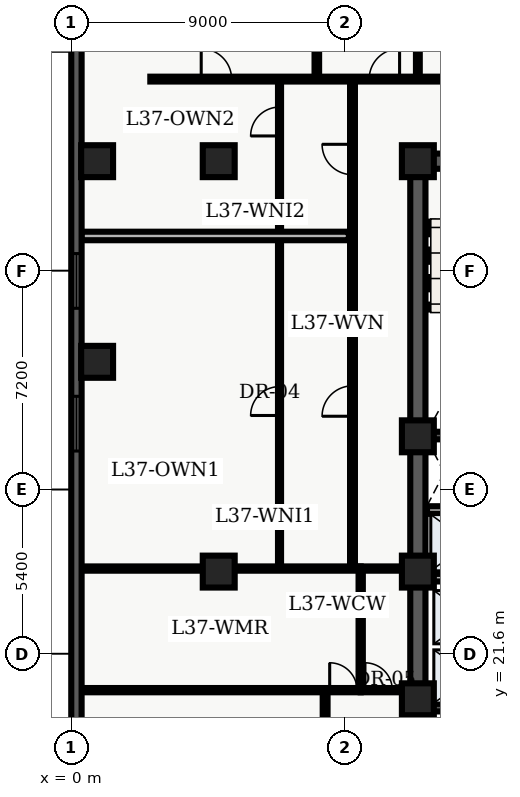
"""IFC4 building model, lengths in metres.
Left out: names, types, materials, properties, quantities, classifications, styles, units other than length and angle.
Written with IfcOpenShell. Run it as: python <this file> out.ifc"""

import sys

from ifc_helpers import new_model, entity, si_unit, converted_unit, direction, frame, origin_with_axes, origin_2d_with_axis, place, context, subcontext, project, spatial, polyline, rectangle, outline, extrude, element, fill, save


model = new_model("IFC4")
c1 = context("Model", 3, precision=1e-05, world=origin_with_axes(), true_north=direction((0.0, 1.0)))
c2 = subcontext(c1, "Body", "Model", "MODEL_VIEW")
j1 = project(units=[si_unit("LENGTHUNIT", "METRE"), converted_unit("PLANEANGLEUNIT", "DEGREE", entity("IfcPlaneAngleMeasure", 0.017), si_unit("PLANEANGLEUNIT", "RADIAN"), dimensions=[0, 0, 0, 0, 0, 0, 0])], contexts=[c1])
p1 = place(None, origin_with_axes())
s1 = spatial("IfcSite", under=j1, at=p1, CompositionType="ELEMENT")
p2 = place(p1, origin_with_axes())
s2 = spatial("IfcBuilding", under=s1, at=p2, CompositionType="ELEMENT")
p3 = place(p2, frame((0.0, 0.0, 152.4), z_axis=(0.0, 0.0, 1.0), x_axis=(1.0, 0.0, 0.0)))
s3 = spatial("IfcBuildingStorey", under=s2, at=p3, CompositionType="ELEMENT", Elevation=152.4)
p4 = place(p3, frame((11.4, 10.8, 0.0), z_axis=(0.0, 0.0, 1.0), x_axis=(0.0, 1.0, 0.0)))
e1 = element("IfcWall", 1, at=p4, inside=s3, PredefinedType="SHEAR", context=c2, shape_type="SweptSolid", body=[
    extrude(outline(polyline([(0.0, -0.25), (27.0, -0.25), (27.0, 0.25), (0.0, 0.25), (0.0, -0.25)])), origin_with_axes(), (0.0, 0.0, 1.0), 3.66),
])
p5 = place(p3, frame((11.4, 37.8, 0.0), z_axis=(0.0, 0.0, 1.0), x_axis=(1.0, 0.0, 0.0)))
e2 = element("IfcWall", 2, at=p5, inside=s3, PredefinedType="SHEAR", context=c2, shape_type="SweptSolid", body=[
    extrude(outline(polyline([(0.0, -0.25), (7.2, -0.25), (7.2, 0.25), (0.0, 0.25), (0.0, -0.25)])), origin_with_axes(), (0.0, 0.0, 1.0), 3.66),
])
p6 = place(p5, frame((2.625, 0.0, 0.0), z_axis=(0.0, 0.0, 1.0), x_axis=(1.0, 0.0, 0.0)))
e3 = element("IfcOpeningElement", 3, at=p6, cuts=e2, PredefinedType="OPENING", context=c2, shape_type="SweptSolid", body=[
    extrude(rectangle(XDim=1.05, YDim=0.52, at=origin_2d_with_axis()), origin_with_axes(), (0.0, 0.0, 1.0), 2.15),
])
for number, where, z_axis, x_axis in (
    (4, (11.65, 19.825, 0.0), (0.0, 0.0, 1.0), (1.0, 0.0, 0.0)),
    (5, (11.65, 28.775, 0.0), (0.0, 0.0, 1.0), (1.0, 0.0, 0.0)),
):
    element("IfcWall", number, at=place(p3, frame(where, z_axis=z_axis, x_axis=x_axis)), inside=s3, PredefinedType="SHEAR", context=c2, shape_type="SweptSolid", body=[
        extrude(outline(polyline([(0.0, -0.125), (6.7, -0.125), (6.7, 0.125), (0.0, 0.125), (0.0, -0.125)])), origin_with_axes(), (0.0, 0.0, 1.0), 3.66),
    ])
p7 = place(p3, frame((11.7, 24.1, 0.0), z_axis=(0.0, 0.0, 1.0), x_axis=(1.0, 0.0, 0.0)))
e6 = element("IfcWall", 6, at=p7, inside=s3, PredefinedType="SOLIDWALL", context=c2, shape_type="SweptSolid", body=[
    extrude(outline(polyline([(0.0, -0.125), (6.6, -0.125), (6.6, 0.125), (0.0, 0.125), (0.0, -0.125)])), origin_with_axes(), (0.0, 0.0, 1.0), 2.7),
])
p8 = place(p7, frame((3.75, 0.0, 0.0), z_axis=(0.0, 0.0, 1.0), x_axis=(1.0, 0.0, 0.0)))
e7 = element("IfcOpeningElement", 7, at=p8, cuts=e6, PredefinedType="OPENING", context=c2, shape_type="SweptSolid", body=[
    extrude(rectangle(XDim=0.9, YDim=0.27, at=origin_2d_with_axis()), origin_with_axes(), (0.0, 0.0, 1.0), 2.15),
])
p9 = place(p3, frame((11.7, 26.325, 0.0), z_axis=(0.0, 0.0, 1.0), x_axis=(1.0, 0.0, 0.0)))
e8 = element("IfcWall", 8, at=p9, inside=s3, PredefinedType="SOLIDWALL", context=c2, shape_type="SweptSolid", body=[
    extrude(outline(polyline([(0.0, -0.125), (6.6, -0.125), (6.6, 0.125), (0.0, 0.125), (0.0, -0.125)])), origin_with_axes(), (0.0, 0.0, 1.0), 2.7),
])
p10 = place(p9, frame((3.5, 0.0, 0.0), z_axis=(0.0, 0.0, 1.0), x_axis=(1.0, 0.0, 0.0)))
e9 = element("IfcOpeningElement", 9, at=p10, cuts=e8, PredefinedType="OPENING", context=c2, shape_type="SweptSolid", body=[
    extrude(rectangle(XDim=0.9, YDim=0.27, at=origin_2d_with_axis()), origin_with_axes(), (0.0, 0.0, 1.0), 2.15),
])
for number, where, z_axis, x_axis in (
    (10, (11.4, 20.1, 0.0), (0.0, 0.0, 1.0), (1.0, 0.0, 0.0)),
    (11, (11.4, 24.3, 0.0), (0.0, 0.0, 1.0), (1.0, 0.0, 0.0)),
    (12, (11.4, 28.75, 0.0), (0.0, 0.0, 1.0), (1.0, 0.0, 0.0)),
    (13, (11.4, 37.8, 0.0), (0.0, 0.0, 1.0), (1.0, 0.0, 0.0)),
    (14, (4.85, 24.3, 0.0), (0.0, 0.0, 1.0), (1.0, 0.0, 0.0)),
    (15, (4.85, 37.8, 0.0), (0.0, 0.0, 1.0), (1.0, 0.0, 0.0)),
    (16, (0.85, 31.2, 0.0), (0.0, 0.0, 1.0), (1.0, 0.0, 0.0)),
    (17, (0.85, 37.8, 0.0), (0.0, 0.0, 1.0), (1.0, 0.0, 0.0)),
):
    element("IfcColumn", number, at=place(p3, frame(where, z_axis=z_axis, x_axis=x_axis)), inside=s3, PredefinedType="COLUMN", context=c2, shape_type="SweptSolid", body=[
        extrude(rectangle(XDim=1.05, YDim=1.05, at=origin_2d_with_axis()), origin_with_axes(), (0.0, 0.0, 1.0), 3.9),
    ])
p11 = place(p3, frame((9.52, 20.4, 0.0), z_axis=(0.0, 0.0, 1.0), x_axis=(0.0, 1.0, 0.0)))
e18 = element("IfcWall", 18, at=p11, inside=s3, PredefinedType="PARTITIONING", context=c2, shape_type="SweptSolid", body=[
    extrude(outline(polyline([(0.0, -0.07), (4.0, -0.07), (4.0, 0.07), (0.0, 0.07), (0.0, -0.07)])), origin_with_axes(), (0.0, 0.0, 1.0), 2.7),
])
p12 = place(p3, frame((9.52, 20.4, 0.0), z_axis=(0.0, 0.0, 1.0), x_axis=(1.0, 0.0, 0.0)))
e19 = element("IfcWall", 19, at=p12, inside=s3, PredefinedType="PARTITIONING", context=c2, shape_type="SweptSolid", body=[
    extrude(outline(polyline([(0.0, -0.07), (1.58, -0.07), (1.58, 0.07), (0.0, 0.07), (0.0, -0.07)])), origin_with_axes(), (0.0, 0.0, 1.0), 2.7),
])
p13 = place(p12, frame((0.59, 0.0, 0.0), z_axis=(0.0, 0.0, 1.0), x_axis=(1.0, 0.0, 0.0)))
e20 = element("IfcOpeningElement", 20, at=p13, cuts=e19, PredefinedType="OPENING", context=c2, shape_type="SweptSolid", body=[
    extrude(rectangle(XDim=0.9, YDim=0.16, at=origin_2d_with_axis()), origin_with_axes(), (0.0, 0.0, 1.0), 2.15),
])
p14 = place(p3, frame((9.52, 24.4, 0.0), z_axis=(0.0, 0.0, 1.0), x_axis=(1.0, 0.0, 0.0)))
e21 = element("IfcWall", 21, at=p14, inside=s3, PredefinedType="PARTITIONING", context=c2, shape_type="SweptSolid", body=[
    extrude(outline(polyline([(0.0, -0.07), (1.58, -0.07), (1.58, 0.07), (0.0, 0.07), (0.0, -0.07)])), origin_with_axes(), (0.0, 0.0, 1.0), 2.7),
])
p15 = place(p3, frame((2.6, 40.5, 0.0), z_axis=(0.0, 0.0, 1.0), x_axis=(1.0, 0.0, 0.0)))
e22 = element("IfcWall", 22, at=p15, inside=s3, PredefinedType="PARTITIONING", context=c2, shape_type="SweptSolid", body=[
    extrude(outline(polyline([(0.0, -0.08), (19.792, -0.08), (19.792, 0.08), (0.0, 0.08), (0.0, -0.08)])), origin_with_axes(), (0.0, 0.0, 1.0), 2.7),
])
p16 = place(p15, frame((2.174, 0.0, 0.0), z_axis=(0.0, 0.0, 1.0), x_axis=(1.0, 0.0, 0.0)))
e23 = element("IfcOpeningElement", 23, at=p16, cuts=e22, PredefinedType="OPENING", context=c2, shape_type="SweptSolid", body=[
    extrude(rectangle(XDim=1.0, YDim=0.18, at=origin_2d_with_axis()), origin_with_axes(), (0.0, 0.0, 1.0), 2.15),
])
p17 = place(p15, frame((7.699, 0.0, 0.0), z_axis=(0.0, 0.0, 1.0), x_axis=(1.0, 0.0, 0.0)))
e24 = element("IfcOpeningElement", 24, at=p17, cuts=e22, PredefinedType="OPENING", context=c2, shape_type="SweptSolid", body=[
    extrude(rectangle(XDim=1.0, YDim=0.18, at=origin_2d_with_axis()), origin_with_axes(), (0.0, 0.0, 1.0), 2.15),
])
p18 = place(p15, frame((10.601, 0.0, 0.0), z_axis=(0.0, 0.0, 1.0), x_axis=(1.0, 0.0, 0.0)))
e25 = element("IfcOpeningElement", 25, at=p18, cuts=e22, PredefinedType="OPENING", context=c2, shape_type="SweptSolid", body=[
    extrude(rectangle(XDim=1.0, YDim=0.18, at=origin_2d_with_axis()), origin_with_axes(), (0.0, 0.0, 1.0), 2.15),
])
p19 = place(p15, frame((14.499, 0.0, 0.0), z_axis=(0.0, 0.0, 1.0), x_axis=(1.0, 0.0, 0.0)))
e26 = element("IfcOpeningElement", 26, at=p19, cuts=e22, PredefinedType="OPENING", context=c2, shape_type="SweptSolid", body=[
    extrude(rectangle(XDim=1.0, YDim=0.18, at=origin_2d_with_axis()), origin_with_axes(), (0.0, 0.0, 1.0), 2.15),
])
p20 = place(p3, frame((8.35, 7.8, 0.0), z_axis=(0.0, 0.0, 1.0), x_axis=(0.0, 1.0, 0.0)))
e27 = element("IfcWall", 27, at=p20, inside=s3, PredefinedType="PARTITIONING", context=c2, shape_type="SweptSolid", body=[
    extrude(outline(polyline([(0.0, -0.08), (12.6, -0.08), (12.6, 0.08), (0.0, 0.08), (0.0, -0.08)])), origin_with_axes(), (0.0, 0.0, 1.0), 2.7),
])
p21 = place(p20, frame((2.92, 0.0, 0.0), z_axis=(0.0, 0.0, 1.0), x_axis=(1.0, 0.0, 0.0)))
e28 = element("IfcOpeningElement", 28, at=p21, cuts=e27, PredefinedType="OPENING", context=c2, shape_type="SweptSolid", body=[
    extrude(rectangle(XDim=1.0, YDim=0.18, at=origin_2d_with_axis()), origin_with_axes(), (0.0, 0.0, 1.0), 2.15),
])
p22 = place(p20, frame((9.115, 0.0, 0.0), z_axis=(0.0, 0.0, 1.0), x_axis=(1.0, 0.0, 0.0)))
e29 = element("IfcOpeningElement", 29, at=p22, cuts=e27, PredefinedType="OPENING", context=c2, shape_type="SweptSolid", body=[
    extrude(rectangle(XDim=1.0, YDim=0.18, at=origin_2d_with_axis()), origin_with_axes(), (0.0, 0.0, 1.0), 2.15),
])
p23 = place(p3, frame((9.25, 24.4, 0.0), z_axis=(0.0, 0.0, 1.0), x_axis=(0.0, 1.0, 0.0)))
e30 = element("IfcWall", 30, at=p23, inside=s3, PredefinedType="PARTITIONING", context=c2, shape_type="SweptSolid", body=[
    extrude(outline(polyline([(0.0, -0.08), (16.1, -0.08), (16.1, 0.08), (0.0, 0.08), (0.0, -0.08)])), origin_with_axes(), (0.0, 0.0, 1.0), 2.7),
])
p24 = place(p23, frame((5.51, 0.0, 0.0), z_axis=(0.0, 0.0, 1.0), x_axis=(1.0, 0.0, 0.0)))
e31 = element("IfcOpeningElement", 31, at=p24, cuts=e30, PredefinedType="OPENING", context=c2, shape_type="SweptSolid", body=[
    extrude(rectangle(XDim=1.0, YDim=0.18, at=origin_2d_with_axis()), origin_with_axes(), (0.0, 0.0, 1.0), 2.15),
])
p25 = place(p23, frame((13.455, 0.0, 0.0), z_axis=(0.0, 0.0, 1.0), x_axis=(1.0, 0.0, 0.0)))
e32 = element("IfcOpeningElement", 32, at=p25, cuts=e30, PredefinedType="OPENING", context=c2, shape_type="SweptSolid", body=[
    extrude(rectangle(XDim=1.0, YDim=0.18, at=origin_2d_with_axis()), origin_with_axes(), (0.0, 0.0, 1.0), 2.15),
])
p26 = place(p3, frame((0.335, 20.4, 0.0), z_axis=(0.0, 0.0, 1.0), x_axis=(1.0, 0.0, 0.0)))
e33 = element("IfcWall", 33, at=p26, inside=s3, PredefinedType="PARTITIONING", context=c2, shape_type="SweptSolid", body=[
    extrude(outline(polyline([(0.0, -0.07), (9.185, -0.07), (9.185, 0.07), (0.0, 0.07), (0.0, -0.07)])), origin_with_axes(), (0.0, 0.0, 1.0), 2.7),
])
p27 = place(p26, frame((8.615, 0.0, 0.0), z_axis=(0.0, 0.0, 1.0), x_axis=(1.0, 0.0, 0.0)))
e34 = element("IfcOpeningElement", 34, at=p27, cuts=e33, PredefinedType="OPENING", context=c2, shape_type="SweptSolid", body=[
    extrude(rectangle(XDim=0.9, YDim=0.16, at=origin_2d_with_axis()), origin_with_axes(), (0.0, 0.0, 1.0), 2.15),
])
p28 = place(p3, frame((0.335, 24.4, 0.0), z_axis=(0.0, 0.0, 1.0), x_axis=(1.0, 0.0, 0.0)))
e35 = element("IfcWall", 35, at=p28, inside=s3, PredefinedType="PARTITIONING", context=c2, shape_type="SweptSolid", body=[
    extrude(outline(polyline([(0.0, -0.07), (9.185, -0.07), (9.185, 0.07), (0.0, 0.07), (0.0, -0.07)])), origin_with_axes(), (0.0, 0.0, 1.0), 2.7),
])
p29 = place(p3, frame((6.85, 24.55, 0.0), z_axis=(0.0, 0.0, 1.0), x_axis=(0.0, 1.0, 0.0)))
e36 = element("IfcWall", 36, at=p29, inside=s3, PredefinedType="PARTITIONING", context=c2, shape_type="SweptSolid", body=[
    extrude(outline(polyline([(0.0, -0.05), (15.75, -0.05), (15.75, 0.05), (0.0, 0.05), (0.0, -0.05)])), origin_with_axes(), (0.0, 0.0, 1.0), 2.7),
])
p30 = place(p29, frame((5.36, 0.0, 0.0), z_axis=(0.0, 0.0, 1.0), x_axis=(1.0, 0.0, 0.0)))
e37 = element("IfcOpeningElement", 37, at=p30, cuts=e36, PredefinedType="OPENING", context=c2, shape_type="SweptSolid", body=[
    extrude(rectangle(XDim=0.95, YDim=0.12, at=origin_2d_with_axis()), origin_with_axes(), (0.0, 0.0, 1.0), 2.15),
])
p31 = place(p29, frame((14.555, 0.0, 0.0), z_axis=(0.0, 0.0, 1.0), x_axis=(1.0, 0.0, 0.0)))
e38 = element("IfcOpeningElement", 38, at=p31, cuts=e36, PredefinedType="OPENING", context=c2, shape_type="SweptSolid", body=[
    extrude(rectangle(XDim=0.95, YDim=0.12, at=origin_2d_with_axis()), origin_with_axes(), (0.0, 0.0, 1.0), 2.15),
])
p32 = place(p3, frame((0.335, 35.34, 0.0), z_axis=(0.0, 0.0, 1.0), x_axis=(1.0, 0.0, 0.0)))
e39 = element("IfcWall", 39, at=p32, inside=s3, PredefinedType="PARTITIONING", context=c2, shape_type="SweptSolid", body=[
    extrude(outline(polyline([(0.0, -0.14), (8.795, -0.14), (8.795, 0.14), (0.0, 0.14), (0.0, -0.14)])), origin_with_axes(), (0.0, 0.0, 1.0), 2.7),
])
p33 = place(p3, frame((8.077, 40.6, 0.0), z_axis=(0.0, 0.0, 1.0), x_axis=(0.0, 1.0, 0.0)))
e40 = element("IfcWall", 40, at=p33, inside=s3, PredefinedType="PARTITIONING", context=c2, shape_type="SweptSolid", body=[
    extrude(outline(polyline([(0.0, -0.075), (7.665, -0.075), (7.665, 0.075), (0.0, 0.075), (0.0, -0.075)])), origin_with_axes(), (0.0, 0.0, 1.0), 2.7),
])
p34 = place(p3, frame((11.4, 40.6, 0.0), z_axis=(0.0, 0.0, 1.0), x_axis=(0.0, 1.0, 0.0)))
e41 = element("IfcWall", 41, at=p34, inside=s3, PredefinedType="PARTITIONING", context=c2, shape_type="SweptSolid", body=[
    extrude(outline(polyline([(0.0, -0.062), (7.665, -0.062), (7.665, 0.062), (0.0, 0.062), (0.0, -0.062)])), origin_with_axes(), (0.0, 0.0, 1.0), 2.7),
])
p35 = place(p3, frame((0.17, 2.74, 0.0), z_axis=(0.0, 0.0, 1.0), x_axis=(0.0, 1.0, 0.0)))
e42 = element("IfcWall", 42, at=p35, inside=s3, PredefinedType="SOLIDWALL", context=c2, shape_type="SweptSolid", body=[
    extrude(outline(polyline([(0.0, -0.17), (43.46, -0.17), (43.46, 0.17), (0.0, 0.17), (0.0, -0.17)])), origin_with_axes(), (0.0, 0.0, 1.0), 3.66),
])
p36 = place(p35, frame((2.948, 0.0, 0.45), z_axis=(0.0, 0.0, 1.0), x_axis=(1.0, 0.0, 0.0)))
e43 = element("IfcOpeningElement", 43, at=p36, cuts=e42, PredefinedType="OPENING", context=c2, shape_type="SweptSolid", body=[
    extrude(rectangle(XDim=1.8, YDim=0.36, at=origin_2d_with_axis()), origin_with_axes(), (0.0, 0.0, 1.0), 2.1),
])
p37 = place(p35, frame((12.339, 0.0, 0.45), z_axis=(0.0, 0.0, 1.0), x_axis=(1.0, 0.0, 0.0)))
e44 = element("IfcOpeningElement", 44, at=p37, cuts=e42, PredefinedType="OPENING", context=c2, shape_type="SweptSolid", body=[
    extrude(rectangle(XDim=1.8, YDim=0.36, at=origin_2d_with_axis()), origin_with_axes(), (0.0, 0.0, 1.0), 2.1),
])
p38 = place(p35, frame((26.426, 0.0, 0.45), z_axis=(0.0, 0.0, 1.0), x_axis=(1.0, 0.0, 0.0)))
e45 = element("IfcOpeningElement", 45, at=p38, cuts=e42, PredefinedType="OPENING", context=c2, shape_type="SweptSolid", body=[
    extrude(rectangle(XDim=1.8, YDim=0.36, at=origin_2d_with_axis()), origin_with_axes(), (0.0, 0.0, 1.0), 2.1),
])
p39 = place(p35, frame((31.121, 0.0, 0.45), z_axis=(0.0, 0.0, 1.0), x_axis=(1.0, 0.0, 0.0)))
e46 = element("IfcOpeningElement", 46, at=p39, cuts=e42, PredefinedType="OPENING", context=c2, shape_type="SweptSolid", body=[
    extrude(rectangle(XDim=1.8, YDim=0.36, at=origin_2d_with_axis()), origin_with_axes(), (0.0, 0.0, 1.0), 2.1),
])
p40 = place(p35, frame((40.062, 0.0, 0.45), z_axis=(0.0, 0.0, 1.0), x_axis=(1.0, 0.0, 0.0)))
e47 = element("IfcOpeningElement", 47, at=p40, cuts=e42, PredefinedType="OPENING", context=c2, shape_type="SweptSolid", body=[
    extrude(rectangle(XDim=1.8, YDim=0.36, at=origin_2d_with_axis()), origin_with_axes(), (0.0, 0.0, 1.0), 2.1),
])
p41 = place(p12, frame((0.59, 0.0, 0.0), z_axis=(0.0, 0.0, 1.0), x_axis=(1.0, 0.0, 0.0)))
e48 = element("IfcDoor", 48, at=p41, inside=s3, OperationType="SINGLE_SWING_LEFT", PredefinedType="DOOR", context=c2, shape_type="SweptSolid", body=[
    extrude(rectangle(XDim=0.9, YDim=0.084, at=origin_2d_with_axis()), origin_with_axes(), (0.0, 0.0, 1.0), 2.15),
])
fill(e20, e48)
p42 = place(p26, frame((8.615, 0.0, 0.0), z_axis=(0.0, 0.0, 1.0), x_axis=(1.0, 0.0, 0.0)))
e49 = element("IfcDoor", 49, at=p42, inside=s3, OperationType="SINGLE_SWING_LEFT", PredefinedType="DOOR", context=c2, shape_type="SweptSolid", body=[
    extrude(rectangle(XDim=0.9, YDim=0.084, at=origin_2d_with_axis()), origin_with_axes(), (0.0, 0.0, 1.0), 2.15),
])
fill(e34, e49)
p43 = place(p29, frame((5.36, 0.0, 0.0), z_axis=(0.0, 0.0, 1.0), x_axis=(1.0, 0.0, 0.0)))
e50 = element("IfcDoor", 50, at=p43, inside=s3, OperationType="SINGLE_SWING_LEFT", PredefinedType="DOOR", context=c2, shape_type="SweptSolid", body=[
    extrude(rectangle(XDim=0.95, YDim=0.06, at=origin_2d_with_axis()), origin_with_axes(), (0.0, 0.0, 1.0), 2.15),
])
fill(e37, e50)
p44 = place(p23, frame((5.51, 0.0, 0.0), z_axis=(0.0, 0.0, 1.0), x_axis=(1.0, 0.0, 0.0)))
e51 = element("IfcDoor", 51, at=p44, inside=s3, OperationType="SINGLE_SWING_LEFT", PredefinedType="DOOR", context=c2, shape_type="SweptSolid", body=[
    extrude(rectangle(XDim=1.0, YDim=0.09, at=origin_2d_with_axis()), origin_with_axes(), (0.0, 0.0, 1.0), 2.15),
])
fill(e31, e51)
p45 = place(p29, frame((14.555, 0.0, 0.0), z_axis=(0.0, 0.0, 1.0), x_axis=(1.0, 0.0, 0.0)))
e52 = element("IfcDoor", 52, at=p45, inside=s3, OperationType="SINGLE_SWING_LEFT", PredefinedType="DOOR", context=c2, shape_type="SweptSolid", body=[
    extrude(rectangle(XDim=0.95, YDim=0.06, at=origin_2d_with_axis()), origin_with_axes(), (0.0, 0.0, 1.0), 2.15),
])
fill(e38, e52)
p46 = place(p23, frame((13.455, 0.0, 0.0), z_axis=(0.0, 0.0, 1.0), x_axis=(1.0, 0.0, 0.0)))
e53 = element("IfcDoor", 53, at=p46, inside=s3, OperationType="SINGLE_SWING_RIGHT", PredefinedType="DOOR", context=c2, shape_type="SweptSolid", body=[
    extrude(rectangle(XDim=1.0, YDim=0.09, at=origin_2d_with_axis()), origin_with_axes(), (0.0, 0.0, 1.0), 2.15),
])
fill(e32, e53)
p47 = place(p15, frame((2.174, 0.0, 0.0), z_axis=(0.0, 0.0, 1.0), x_axis=(1.0, 0.0, 0.0)))
e54 = element("IfcDoor", 54, at=p47, inside=s3, OperationType="SINGLE_SWING_LEFT", PredefinedType="DOOR", context=c2, shape_type="SweptSolid", body=[
    extrude(rectangle(XDim=1.0, YDim=0.09, at=origin_2d_with_axis()), origin_with_axes(), (0.0, 0.0, 1.0), 2.15),
])
fill(e23, e54)
p48 = place(p15, frame((7.699, 0.0, 0.0), z_axis=(0.0, 0.0, 1.0), x_axis=(1.0, 0.0, 0.0)))
e55 = element("IfcDoor", 55, at=p48, inside=s3, OperationType="SINGLE_SWING_RIGHT", PredefinedType="DOOR", context=c2, shape_type="SweptSolid", body=[
    extrude(rectangle(XDim=1.0, YDim=0.09, at=origin_2d_with_axis()), origin_with_axes(), (0.0, 0.0, 1.0), 2.15),
])
fill(e24, e55)
p49 = place(p35, frame((26.426, 0.0, 0.45), z_axis=(0.0, 0.0, 1.0), x_axis=(1.0, 0.0, 0.0)))
e56 = element("IfcWindow", 56, at=p49, inside=s3, PredefinedType="WINDOW", context=c2, shape_type="SweptSolid", body=[
    extrude(rectangle(XDim=1.8, YDim=0.09, at=origin_2d_with_axis()), origin_with_axes(), (0.0, 0.0, 1.0), 2.1),
])
fill(e45, e56)
p50 = place(p35, frame((31.121, 0.0, 0.45), z_axis=(0.0, 0.0, 1.0), x_axis=(1.0, 0.0, 0.0)))
e57 = element("IfcWindow", 57, at=p50, inside=s3, PredefinedType="WINDOW", context=c2, shape_type="SweptSolid", body=[
    extrude(rectangle(XDim=1.8, YDim=0.09, at=origin_2d_with_axis()), origin_with_axes(), (0.0, 0.0, 1.0), 2.1),
])
fill(e46, e57)
save(model, sys.argv[1])
